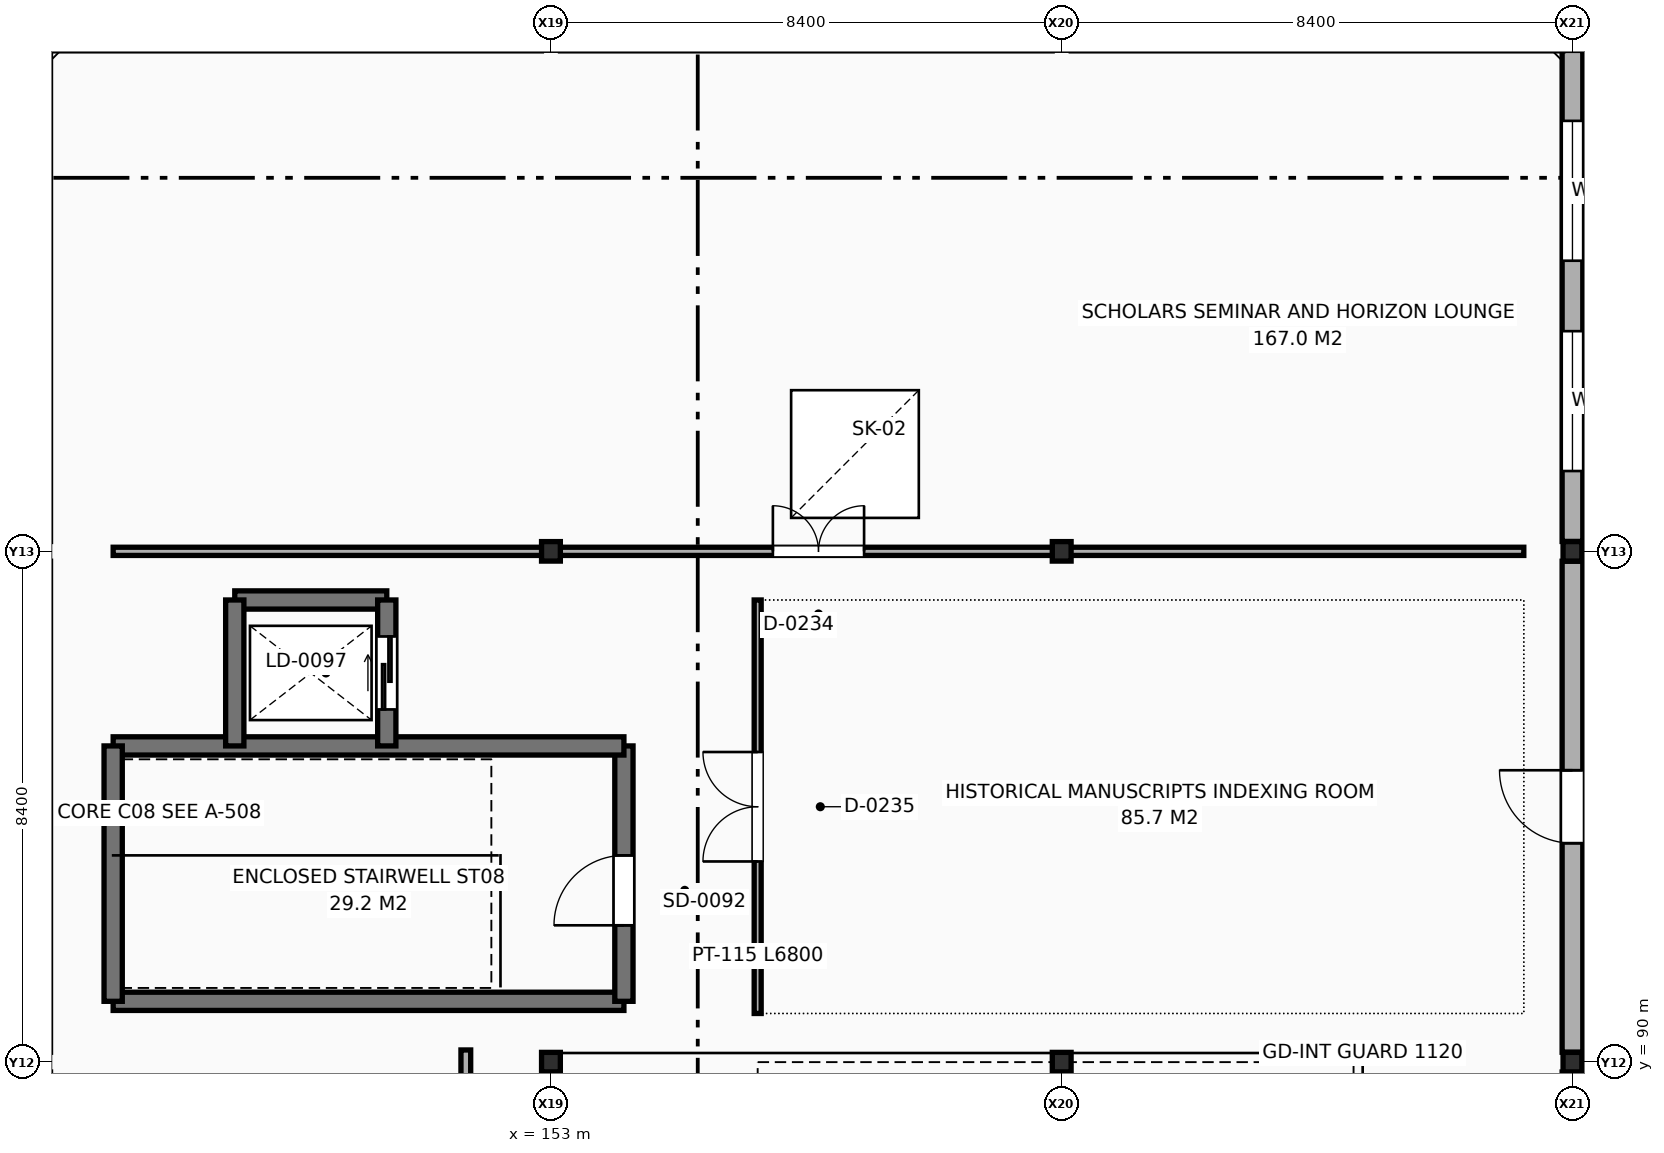
"""IFC4 building model, lengths in metres.
Left out: names, types, materials, properties, quantities, classifications, styles, units other than length and angle.
Written with IfcOpenShell. Run it as: python <this file> out.ifc"""

import sys

from ifc_helpers import new_model, si_unit, direction, frame, frame_2d, origin, origin_2d, place, context, subcontext, project, spatial, rectangle, i_section, extrude, element, fill, save


model = new_model("IFC4")
c1 = context("Model", 3, precision=1e-05, world=origin(), true_north=direction((0.0, 1.0)))
c2 = subcontext(c1, "Body", "Model", "MODEL_VIEW")
j1 = project(units=[si_unit("LENGTHUNIT", "METRE"), si_unit("PLANEANGLEUNIT", "RADIAN")], contexts=[c1])
p1 = place(None, origin())
s1 = spatial("IfcSite", under=j1, at=p1, CompositionType="ELEMENT")
p2 = place(p1, origin())
s2 = spatial("IfcBuilding", under=s1, at=p2, CompositionType="ELEMENT")
p3 = place(p2, frame((0.0, 0.0, 13.8)))
s3 = spatial("IfcBuildingStorey", under=s2, at=p3, CompositionType="ELEMENT", Elevation=13.8)
for number, where, z_axis, x_axis in (
    (1, (153.0, 90.0, 0.0), (0.0, 0.0, 1.0), (1.0, 0.0, 0.0)),
    (2, (153.0, 98.4, 0.0), (0.0, 0.0, 1.0), (1.0, 0.0, 0.0)),
    (3, (161.4, 90.0, 0.0), (0.0, 0.0, 1.0), (1.0, 0.0, 0.0)),
    (4, (161.4, 98.4, 0.0), (0.0, 0.0, 1.0), (1.0, 0.0, 0.0)),
    (5, (169.8, 90.0, 0.0), (0.0, 0.0, 1.0), (1.0, 0.0, 0.0)),
    (6, (169.8, 98.4, 0.0), (0.0, 0.0, 1.0), (1.0, 0.0, 0.0)),
):
    element("IfcColumn", number, at=place(p3, frame(where, z_axis=z_axis, x_axis=x_axis)), inside=s3, PredefinedType="COLUMN", context=c2, shape_type="SweptSolid", body=[
        extrude(i_section(OverallWidth=0.309, OverallDepth=0.321, WebThickness=0.014, FlangeThickness=0.022, FilletRadius=0.015, at=origin_2d()), origin(), (0.0, 0.0, 1.0), 4.2),
    ])
p4 = place(p3, frame((169.8, 81.762, 0.0), z_axis=(0.0, 0.0, 1.0), x_axis=(0.0, 1.0, 0.0)))
e7 = element("IfcWall", 7, at=p4, inside=s3, PredefinedType="SOLIDWALL", context=c2, shape_type="SweptSolid", body=[
    extrude(rectangle(XDim=8.075, YDim=0.34, at=frame_2d((4.038, 0.0))), origin(), (0.0, 0.0, 1.0), 3.18),
])
p5 = place(p4, frame((1.358, 0.0, 0.9)))
e8 = element("IfcOpeningElement", 8, at=p5, cuts=e7, PredefinedType="OPENING", context=c2, shape_type="SweptSolid", body=[
    extrude(rectangle(XDim=2.0, YDim=1.8, at=frame_2d((1.0, 0.9))), frame((0.0, 0.18, 0.0), z_axis=(0.0, -1.0, 0.0), x_axis=(1.0, 0.0, 0.0)), (0.0, 0.0, 1.0), 0.36),
])
p6 = place(p4, frame((4.717, 0.0, 0.9)))
e9 = element("IfcOpeningElement", 9, at=p6, cuts=e7, PredefinedType="OPENING", context=c2, shape_type="SweptSolid", body=[
    extrude(rectangle(XDim=2.0, YDim=1.8, at=frame_2d((1.0, 0.9))), frame((0.0, 0.18, 0.0), z_axis=(0.0, -1.0, 0.0), x_axis=(1.0, 0.0, 0.0)), (0.0, 0.0, 1.0), 0.36),
])
p7 = place(p3, frame((169.8, 90.162, 0.0), z_axis=(0.0, 0.0, 1.0), x_axis=(0.0, 1.0, 0.0)))
e10 = element("IfcWall", 10, at=p7, inside=s3, PredefinedType="SOLIDWALL", context=c2, shape_type="SweptSolid", body=[
    extrude(rectangle(XDim=8.075, YDim=0.34, at=frame_2d((4.038, 0.0))), origin(), (0.0, 0.0, 1.0), 3.18),
])
p8 = place(p7, frame((3.438, 0.0, 0.0)))
e11 = element("IfcOpeningElement", 11, at=p8, cuts=e10, PredefinedType="OPENING", context=c2, shape_type="SweptSolid", body=[
    extrude(rectangle(XDim=1.2, YDim=2.2, at=frame_2d((0.6, 1.1))), frame((0.0, 0.18, 0.0), z_axis=(0.0, -1.0, 0.0), x_axis=(1.0, 0.0, 0.0)), (0.0, 0.0, 1.0), 0.36),
])
p9 = place(p3, frame((169.8, 98.562, 0.0), z_axis=(0.0, 0.0, 1.0), x_axis=(0.0, 1.0, 0.0)))
e12 = element("IfcWall", 12, at=p9, inside=s3, PredefinedType="SOLIDWALL", context=c2, shape_type="SweptSolid", body=[
    extrude(rectangle(XDim=8.075, YDim=0.34, at=frame_2d((4.038, 0.0))), origin(), (0.0, 0.0, 1.0), 3.18),
])
p10 = place(p9, frame((1.158, 0.0, 0.9)))
e13 = element("IfcOpeningElement", 13, at=p10, cuts=e12, PredefinedType="OPENING", context=c2, shape_type="SweptSolid", body=[
    extrude(rectangle(XDim=2.3, YDim=1.8, at=frame_2d((1.15, 0.9))), frame((0.0, 0.18, 0.0), z_axis=(0.0, -1.0, 0.0), x_axis=(1.0, 0.0, 0.0)), (0.0, 0.0, 1.0), 0.36),
])
p11 = place(p9, frame((4.617, 0.0, 0.9)))
e14 = element("IfcOpeningElement", 14, at=p11, cuts=e12, PredefinedType="OPENING", context=c2, shape_type="SweptSolid", body=[
    extrude(rectangle(XDim=2.3, YDim=1.8, at=frame_2d((1.15, 0.9))), frame((0.0, 0.18, 0.0), z_axis=(0.0, -1.0, 0.0), x_axis=(1.0, 0.0, 0.0)), (0.0, 0.0, 1.0), 0.36),
])
p12 = place(p3, frame((145.8, 91.0, 0.0), z_axis=(0.0, 0.0, 1.0), x_axis=(1.0, 0.0, 0.0)))
e15 = element("IfcWall", 15, at=p12, inside=s3, PredefinedType="SHEAR", context=c2, shape_type="SweptSolid", body=[
    extrude(rectangle(XDim=8.4, YDim=0.3, at=frame_2d((4.2, 0.0))), origin(), (0.0, 0.0, 1.0), 3.92),
])
p13 = place(p3, frame((154.2, 91.0, 0.0), z_axis=(0.0, 0.0, 1.0), x_axis=(0.0, 1.0, 0.0)))
e16 = element("IfcWall", 16, at=p13, inside=s3, PredefinedType="SHEAR", context=c2, shape_type="SweptSolid", body=[
    extrude(rectangle(XDim=4.2, YDim=0.3, at=frame_2d((2.1, 0.0))), origin(), (0.0, 0.0, 1.0), 3.92),
])
p14 = place(p13, frame((1.25, 0.0, 0.0)))
e17 = element("IfcOpeningElement", 17, at=p14, cuts=e16, PredefinedType="OPENING", context=c2, shape_type="SweptSolid", body=[
    extrude(rectangle(XDim=1.15, YDim=2.2, at=frame_2d((0.575, 1.1))), frame((0.0, 0.16, 0.0), z_axis=(0.0, -1.0, 0.0), x_axis=(1.0, 0.0, 0.0)), (0.0, 0.0, 1.0), 0.32),
])
p15 = place(p3, frame((154.2, 95.2, 0.0), z_axis=(0.0, 0.0, 1.0), x_axis=(-1.0, 0.0, 0.0)))
e18 = element("IfcWall", 18, at=p15, inside=s3, PredefinedType="SHEAR", context=c2, shape_type="SweptSolid", body=[
    extrude(rectangle(XDim=8.4, YDim=0.3, at=frame_2d((4.2, 0.0))), origin(), (0.0, 0.0, 1.0), 3.92),
])
p16 = place(p3, frame((145.8, 95.2, 0.0), z_axis=(0.0, 0.0, 1.0), x_axis=(0.0, -1.0, 0.0)))
e19 = element("IfcWall", 19, at=p16, inside=s3, PredefinedType="SHEAR", context=c2, shape_type="SweptSolid", body=[
    extrude(rectangle(XDim=4.2, YDim=0.3, at=frame_2d((2.1, 0.0))), origin(), (0.0, 0.0, 1.0), 3.92),
])
p17 = place(p3, frame((150.3, 97.6, 0.0), z_axis=(0.0, 0.0, 1.0), x_axis=(-1.0, 0.0, 0.0)))
e20 = element("IfcWall", 20, at=p17, inside=s3, PredefinedType="SHEAR", context=c2, shape_type="SweptSolid", body=[
    extrude(rectangle(XDim=2.5, YDim=0.3, at=frame_2d((1.25, 0.0))), origin(), (0.0, 0.0, 1.0), 3.92),
])
p18 = place(p3, frame((147.8, 97.6, 0.0), z_axis=(0.0, 0.0, 1.0), x_axis=(0.0, -1.0, 0.0)))
e21 = element("IfcWall", 21, at=p18, inside=s3, PredefinedType="SHEAR", context=c2, shape_type="SweptSolid", body=[
    extrude(rectangle(XDim=2.4, YDim=0.3, at=frame_2d((1.2, 0.0))), origin(), (0.0, 0.0, 1.0), 3.92),
])
p19 = place(p3, frame((150.3, 95.2, 0.0), z_axis=(0.0, 0.0, 1.0), x_axis=(0.0, 1.0, 0.0)))
e22 = element("IfcWall", 22, at=p19, inside=s3, PredefinedType="SHEAR", context=c2, shape_type="SweptSolid", body=[
    extrude(rectangle(XDim=2.4, YDim=0.3, at=frame_2d((1.2, 0.0))), origin(), (0.0, 0.0, 1.0), 3.92),
])
p20 = place(p19, frame((0.6, 0.0, 0.0)))
e23 = element("IfcOpeningElement", 23, at=p20, cuts=e22, PredefinedType="OPENING", context=c2, shape_type="SweptSolid", body=[
    extrude(rectangle(XDim=1.2, YDim=2.25, at=frame_2d((0.6, 1.125))), frame((0.0, 0.16, 0.0), z_axis=(0.0, -1.0, 0.0), x_axis=(1.0, 0.0, 0.0)), (0.0, 0.0, 1.0), 0.32),
])
p21 = place(p3, frame((145.8, 98.4, 0.0), z_axis=(0.0, 0.0, 1.0), x_axis=(1.0, 0.0, 0.0)))
e24 = element("IfcWall", 24, at=p21, inside=s3, PredefinedType="PARTITIONING", context=c2, shape_type="SweptSolid", body=[
    extrude(rectangle(XDim=23.2, YDim=0.135, at=frame_2d((11.6, 0.0))), origin(), (0.0, 0.0, 1.0), 2.88),
])
p22 = place(p21, frame((10.85, 0.0, 0.0)))
e25 = element("IfcOpeningElement", 25, at=p22, cuts=e24, PredefinedType="OPENING", context=c2, shape_type="SweptSolid", body=[
    extrude(rectangle(XDim=1.5, YDim=2.35, at=frame_2d((0.75, 1.175))), frame((0.0, 0.077, 0.0), z_axis=(0.0, -1.0, 0.0), x_axis=(1.0, 0.0, 0.0)), (0.0, 0.0, 1.0), 0.155),
])
p23 = place(p3, frame((156.4, 90.8, 0.0), z_axis=(0.0, 0.0, 1.0), x_axis=(0.0, 1.0, 0.0)))
e26 = element("IfcWall", 26, at=p23, inside=s3, PredefinedType="PARTITIONING", context=c2, shape_type="SweptSolid", body=[
    extrude(rectangle(XDim=6.8, YDim=0.115, at=frame_2d((3.4, 0.0))), origin(), (0.0, 0.0, 1.0), 3.86),
])
p24 = place(p23, frame((2.5, 0.0, 0.0)))
e27 = element("IfcOpeningElement", 27, at=p24, cuts=e26, PredefinedType="OPENING", context=c2, shape_type="SweptSolid", body=[
    extrude(rectangle(XDim=1.8, YDim=2.4, at=frame_2d((0.9, 1.2))), frame((0.0, 0.067, 0.0), z_axis=(0.0, -1.0, 0.0), x_axis=(1.0, 0.0, 0.0)), (0.0, 0.0, 1.0), 0.135),
])
p25 = place(p3, frame((151.6, 73.4, 0.0), z_axis=(0.0, 0.0, 1.0), x_axis=(0.0, 1.0, 0.0)))
e28 = element("IfcWall", 28, at=p25, inside=s3, PredefinedType="PARTITIONING", context=c2, shape_type="SweptSolid", body=[
    extrude(rectangle(XDim=16.8, YDim=0.16, at=frame_2d((8.4, 0.0))), origin(), (0.0, 0.0, 1.0), 3.86),
])
p26 = place(p25, frame((4.56, 0.0, 0.0)))
e29 = element("IfcOpeningElement", 29, at=p26, cuts=e28, PredefinedType="OPENING", context=c2, shape_type="SweptSolid", body=[
    extrude(rectangle(XDim=1.6, YDim=2.3, at=frame_2d((0.8, 1.15))), frame((0.0, 0.09, 0.0), z_axis=(0.0, -1.0, 0.0), x_axis=(1.0, 0.0, 0.0)), (0.0, 0.0, 1.0), 0.18),
])
p27 = place(p8, frame((1.2, 0.0, 0.0), z_axis=(0.0, 0.0, 1.0), x_axis=(-1.0, 0.0, 0.0)))
e30 = element("IfcDoor", 30, at=p27, inside=s3, OperationType="SINGLE_SWING_RIGHT", PredefinedType="DOOR", context=c2, shape_type="SweptSolid", body=[
    extrude(rectangle(XDim=1.2, YDim=2.2, at=frame_2d((0.6, 1.1))), frame((0.0, 0.025, 0.0), z_axis=(0.0, -1.0, 0.0), x_axis=(1.0, 0.0, 0.0)), (0.0, 0.0, 1.0), 0.05),
])
fill(e11, e30)
p28 = place(p10, origin())
e31 = element("IfcWindow", 31, at=p28, inside=s3, PartitioningType="SINGLE_PANEL", PredefinedType="WINDOW", context=c2, shape_type="SweptSolid", body=[
    extrude(rectangle(XDim=2.3, YDim=1.8, at=frame_2d((1.15, 0.9))), frame((0.0, 0.03, 0.0), z_axis=(0.0, -1.0, 0.0), x_axis=(1.0, 0.0, 0.0)), (0.0, 0.0, 1.0), 0.06),
])
fill(e13, e31)
p29 = place(p11, origin())
e32 = element("IfcWindow", 32, at=p29, inside=s3, PartitioningType="SINGLE_PANEL", PredefinedType="WINDOW", context=c2, shape_type="SweptSolid", body=[
    extrude(rectangle(XDim=2.3, YDim=1.8, at=frame_2d((1.15, 0.9))), frame((0.0, 0.03, 0.0), z_axis=(0.0, -1.0, 0.0), x_axis=(1.0, 0.0, 0.0)), (0.0, 0.0, 1.0), 0.06),
])
fill(e14, e32)
p30 = place(p2, frame((0.0, 0.0, 30.6)))
p31 = place(p30, frame((0.0, 0.0, -12.87)))
p32 = place(p31, frame((158.0, 100.0, 0.0)))
p33 = place(p32, frame((0.0, 0.0, 0.11)))
e33 = element("IfcWindow", 33, at=p33, inside=s3, PartitioningType="SINGLE_PANEL", PredefinedType="SKYLIGHT", context=c2, shape_type="SweptSolid", body=[
    extrude(rectangle(XDim=2.1, YDim=2.1, at=origin_2d()), origin(), (0.0, 0.0, 1.0), 0.05),
])
p34 = place(p14, origin())
e34 = element("IfcDoor", 34, at=p34, inside=s3, OperationType="SINGLE_SWING_LEFT", PredefinedType="DOOR", context=c2, shape_type="SweptSolid", body=[
    extrude(rectangle(XDim=1.15, YDim=2.2, at=frame_2d((0.575, 1.1))), frame((0.0, 0.025, 0.0), z_axis=(0.0, -1.0, 0.0), x_axis=(1.0, 0.0, 0.0)), (0.0, 0.0, 1.0), 0.05),
])
fill(e17, e34)
p35 = place(p20, origin())
e35 = element("IfcDoor", 35, at=p35, inside=s3, OperationType="SLIDING_TO_LEFT", PredefinedType="DOOR", context=c2, shape_type="SweptSolid", body=[
    extrude(rectangle(XDim=1.2, YDim=2.25, at=frame_2d((0.6, 1.125))), frame((0.0, 0.025, 0.0), z_axis=(0.0, -1.0, 0.0), x_axis=(1.0, 0.0, 0.0)), (0.0, 0.0, 1.0), 0.05),
])
fill(e23, e35)
p36 = place(p22, origin())
e36 = element("IfcDoor", 36, at=p36, inside=s3, OperationType="DOUBLE_DOOR_SINGLE_SWING", PredefinedType="DOOR", context=c2, shape_type="SweptSolid", body=[
    extrude(rectangle(XDim=1.5, YDim=2.35, at=frame_2d((0.75, 1.175))), frame((0.0, 0.025, 0.0), z_axis=(0.0, -1.0, 0.0), x_axis=(1.0, 0.0, 0.0)), (0.0, 0.0, 1.0), 0.05),
])
fill(e25, e36)
p37 = place(p24, origin())
e37 = element("IfcDoor", 37, at=p37, inside=s3, OperationType="DOUBLE_DOOR_SINGLE_SWING", PredefinedType="DOOR", context=c2, shape_type="SweptSolid", body=[
    extrude(rectangle(XDim=1.8, YDim=2.4, at=frame_2d((0.9, 1.2))), frame((0.0, 0.025, 0.0), z_axis=(0.0, -1.0, 0.0), x_axis=(1.0, 0.0, 0.0)), (0.0, 0.0, 1.0), 0.05),
])
fill(e27, e37)
save(model, sys.argv[1])
